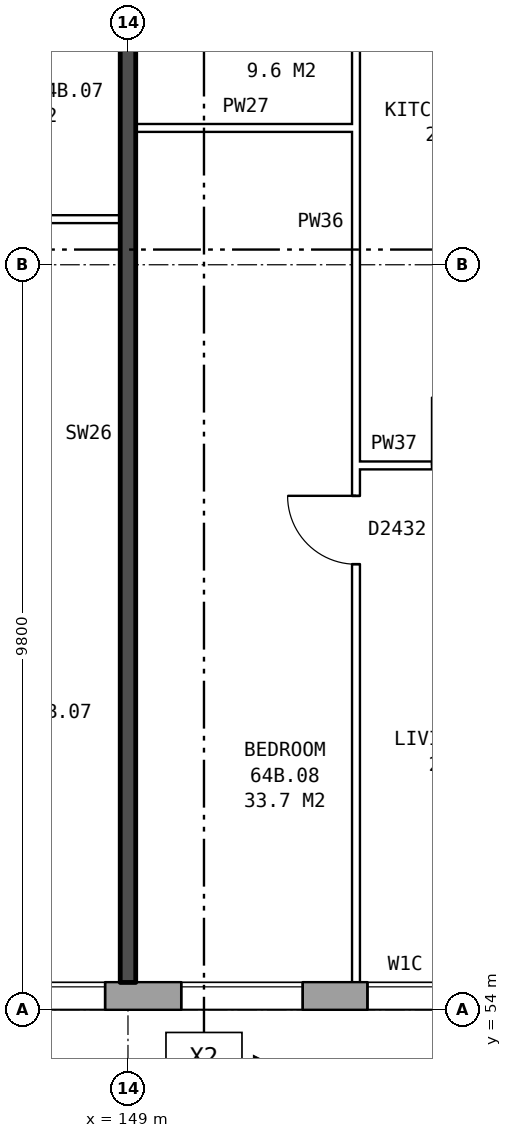
"""IFC4 building model, lengths in metres.
Left out: names, types, materials, properties, quantities, classifications, styles, units other than length and angle.
Written with IfcOpenShell. Run it as: python <this file> out.ifc"""

import sys

from ifc_helpers import new_model, si_unit, direction, frame, frame_2d, origin, place, context, subcontext, project, spatial, rectangle, extrude, element, fill, save


model = new_model("IFC4")
c1 = context("Model", 3, precision=1e-05, world=origin(), true_north=direction((0.0, 1.0)))
c2 = subcontext(c1, "Body", "Model", "MODEL_VIEW")
j1 = project(units=[si_unit("LENGTHUNIT", "METRE"), si_unit("PLANEANGLEUNIT", "RADIAN")], contexts=[c1])
p1 = place(None, origin())
s1 = spatial("IfcSite", under=j1, at=p1, CompositionType="ELEMENT")
p2 = place(p1, origin())
s2 = spatial("IfcBuilding", under=s1, at=p2, CompositionType="ELEMENT")
p3 = place(p2, frame((0.0, 0.0, 227.6)))
s3 = spatial("IfcBuildingStorey", under=s2, at=p3, CompositionType="ELEMENT", Elevation=227.6)
p4 = place(p3, frame((132.05, 54.18, 0.0), z_axis=(0.0, 0.0, 1.0), x_axis=(1.0, 0.0, 0.0)))
e1 = element("IfcWall", 1, at=p4, inside=s3, PredefinedType="STANDARD", context=c2, shape_type="SweptSolid", body=[
    extrude(rectangle(XDim=33.875, YDim=0.36, at=frame_2d((16.938, 0.0))), origin(), (0.0, 0.0, 1.0), 2.85),
])
p5 = place(p4, frame((2.65, 0.0, 0.8)))
e2 = element("IfcOpeningElement", 2, at=p5, cuts=e1, PredefinedType="OPENING", context=c2, shape_type="SweptSolid", body=[
    extrude(rectangle(XDim=1.6, YDim=1.8, at=frame_2d((0.8, 0.9))), frame((0.0, 0.19, 0.0), z_axis=(0.0, -1.0, 0.0), x_axis=(1.0, 0.0, 0.0)), (0.0, 0.0, 1.0), 0.38),
])
p6 = place(p4, frame((5.65, 0.0, 0.8)))
e3 = element("IfcOpeningElement", 3, at=p6, cuts=e1, PredefinedType="OPENING", context=c2, shape_type="SweptSolid", body=[
    extrude(rectangle(XDim=1.6, YDim=1.8, at=frame_2d((0.8, 0.9))), frame((0.0, 0.19, 0.0), z_axis=(0.0, -1.0, 0.0), x_axis=(1.0, 0.0, 0.0)), (0.0, 0.0, 1.0), 0.38),
])
p7 = place(p4, frame((8.65, 0.0, 0.8)))
e4 = element("IfcOpeningElement", 4, at=p7, cuts=e1, PredefinedType="OPENING", context=c2, shape_type="SweptSolid", body=[
    extrude(rectangle(XDim=1.6, YDim=1.8, at=frame_2d((0.8, 0.9))), frame((0.0, 0.19, 0.0), z_axis=(0.0, -1.0, 0.0), x_axis=(1.0, 0.0, 0.0)), (0.0, 0.0, 1.0), 0.38),
])
p8 = place(p4, frame((11.15, 0.0, 0.8)))
e5 = element("IfcOpeningElement", 5, at=p8, cuts=e1, PredefinedType="OPENING", context=c2, shape_type="SweptSolid", body=[
    extrude(rectangle(XDim=1.4, YDim=1.8, at=frame_2d((0.7, 0.9))), frame((0.0, 0.19, 0.0), z_axis=(0.0, -1.0, 0.0), x_axis=(1.0, 0.0, 0.0)), (0.0, 0.0, 1.0), 0.38),
])
p9 = place(p4, frame((15.05, 0.0, 0.8)))
e6 = element("IfcOpeningElement", 6, at=p9, cuts=e1, PredefinedType="OPENING", context=c2, shape_type="SweptSolid", body=[
    extrude(rectangle(XDim=1.6, YDim=1.8, at=frame_2d((0.8, 0.9))), frame((0.0, 0.19, 0.0), z_axis=(0.0, -1.0, 0.0), x_axis=(1.0, 0.0, 0.0)), (0.0, 0.0, 1.0), 0.38),
])
p10 = place(p4, frame((17.65, 0.0, 0.8)))
e7 = element("IfcOpeningElement", 7, at=p10, cuts=e1, PredefinedType="OPENING", context=c2, shape_type="SweptSolid", body=[
    extrude(rectangle(XDim=1.6, YDim=1.8, at=frame_2d((0.8, 0.9))), frame((0.0, 0.19, 0.0), z_axis=(0.0, -1.0, 0.0), x_axis=(1.0, 0.0, 0.0)), (0.0, 0.0, 1.0), 0.38),
])
p11 = place(p4, frame((20.1, 0.0, 0.35)))
e8 = element("IfcOpeningElement", 8, at=p11, cuts=e1, PredefinedType="OPENING", context=c2, shape_type="SweptSolid", body=[
    extrude(rectangle(XDim=1.0, YDim=1.8, at=frame_2d((0.5, 0.9))), frame((0.0, 0.19, 0.0), z_axis=(0.0, -1.0, 0.0), x_axis=(1.0, 0.0, 0.0)), (0.0, 0.0, 1.0), 0.38),
])
p12 = place(p4, frame((23.65, 0.0, 0.8)))
e9 = element("IfcOpeningElement", 9, at=p12, cuts=e1, PredefinedType="OPENING", context=c2, shape_type="SweptSolid", body=[
    extrude(rectangle(XDim=1.6, YDim=1.8, at=frame_2d((0.8, 0.9))), frame((0.0, 0.19, 0.0), z_axis=(0.0, -1.0, 0.0), x_axis=(1.0, 0.0, 0.0)), (0.0, 0.0, 1.0), 0.38),
])
p13 = place(p4, frame((26.65, 0.0, 0.8)))
e10 = element("IfcOpeningElement", 10, at=p13, cuts=e1, PredefinedType="OPENING", context=c2, shape_type="SweptSolid", body=[
    extrude(rectangle(XDim=1.6, YDim=1.8, at=frame_2d((0.8, 0.9))), frame((0.0, 0.19, 0.0), z_axis=(0.0, -1.0, 0.0), x_axis=(1.0, 0.0, 0.0)), (0.0, 0.0, 1.0), 0.38),
])
p14 = place(p4, frame((29.65, 0.0, 0.8)))
e11 = element("IfcOpeningElement", 11, at=p14, cuts=e1, PredefinedType="OPENING", context=c2, shape_type="SweptSolid", body=[
    extrude(rectangle(XDim=1.6, YDim=1.8, at=frame_2d((0.8, 0.9))), frame((0.0, 0.19, 0.0), z_axis=(0.0, -1.0, 0.0), x_axis=(1.0, 0.0, 0.0)), (0.0, 0.0, 1.0), 0.38),
])
p15 = place(p4, frame((12.85, 0.0, 1.7)))
e12 = element("IfcOpeningElement", 12, at=p15, cuts=e1, PredefinedType="OPENING", context=c2, shape_type="SweptSolid", body=[
    extrude(rectangle(XDim=0.6, YDim=0.9, at=frame_2d((0.3, 0.45))), frame((0.0, 0.19, 0.0), z_axis=(0.0, -1.0, 0.0), x_axis=(1.0, 0.0, 0.0)), (0.0, 0.0, 1.0), 0.38),
])
p16 = place(p3, frame((152.0, 61.16, 0.0), z_axis=(0.0, 0.0, 1.0), x_axis=(1.0, 0.0, 0.0)))
e13 = element("IfcWall", 13, at=p16, inside=s3, PredefinedType="PARTITIONING", context=c2, shape_type="SweptSolid", body=[
    extrude(rectangle(XDim=2.9, YDim=0.1, at=frame_2d((1.45, 0.0))), origin(), (0.0, 0.0, 1.0), 2.85),
])
p17 = place(p16, frame((1.0, 0.0, 0.0)))
e14 = element("IfcOpeningElement", 14, at=p17, cuts=e13, PredefinedType="OPENING", context=c2, shape_type="SweptSolid", body=[
    extrude(rectangle(XDim=0.9, YDim=2.1, at=frame_2d((0.45, 1.05))), frame((0.0, 0.06, 0.0), z_axis=(0.0, -1.0, 0.0), x_axis=(1.0, 0.0, 0.0)), (0.0, 0.0, 1.0), 0.12),
])
for number, where, z_axis, x_axis in (
    (15, (146.0, 64.4, 0.0), (0.0, 0.0, 1.0), (1.0, 0.0, 0.0)),
    (16, (149.1, 65.6, 0.0), (0.0, 0.0, 1.0), (1.0, 0.0, 0.0)),
):
    element("IfcWall", number, at=place(p3, frame(where, z_axis=z_axis, x_axis=x_axis)), inside=s3, PredefinedType="PARTITIONING", context=c2, shape_type="SweptSolid", body=[
        extrude(rectangle(XDim=2.9, YDim=0.1, at=frame_2d((1.45, 0.0))), origin(), (0.0, 0.0, 1.0), 2.85),
    ])
p18 = place(p3, frame((149.0, 54.36, 0.0), z_axis=(0.0, 0.0, 1.0), x_axis=(0.0, 1.0, 0.0)))
e17 = element("IfcWall", 17, at=p18, inside=s3, PredefinedType="SOLIDWALL", context=c2, shape_type="SweptSolid", body=[
    extrude(rectangle(XDim=14.44, YDim=0.2, at=frame_2d((7.22, 0.0))), origin(), (0.0, 0.0, 1.0), 2.85),
])
p19 = place(p3, frame((152.0, 54.36, 0.0), z_axis=(0.0, 0.0, 1.0), x_axis=(0.0, 1.0, 0.0)))
e18 = element("IfcWall", 18, at=p19, inside=s3, PredefinedType="PARTITIONING", context=c2, shape_type="SweptSolid", body=[
    extrude(rectangle(XDim=14.34, YDim=0.1, at=frame_2d((7.17, 0.0))), origin(), (0.0, 0.0, 1.0), 2.85),
])
p20 = place(p19, frame((5.5, 0.0, 0.0)))
e19 = element("IfcOpeningElement", 19, at=p20, cuts=e18, PredefinedType="OPENING", context=c2, shape_type="SweptSolid", body=[
    extrude(rectangle(XDim=0.9, YDim=2.1, at=frame_2d((0.45, 1.05))), frame((0.0, 0.06, 0.0), z_axis=(0.0, -1.0, 0.0), x_axis=(1.0, 0.0, 0.0)), (0.0, 0.0, 1.0), 0.12),
])
p21 = place(p19, frame((13.04, 0.0, 0.0)))
e20 = element("IfcOpeningElement", 20, at=p21, cuts=e18, PredefinedType="OPENING", context=c2, shape_type="SweptSolid", body=[
    extrude(rectangle(XDim=0.9, YDim=2.1, at=frame_2d((0.45, 1.05))), frame((0.0, 0.06, 0.0), z_axis=(0.0, -1.0, 0.0), x_axis=(1.0, 0.0, 0.0)), (0.0, 0.0, 1.0), 0.12),
])
p22 = place(p9, origin())
e21 = element("IfcWindow", 21, at=p22, inside=s3, PartitioningType="SINGLE_PANEL", PredefinedType="WINDOW", context=c2, shape_type="SweptSolid", body=[
    extrude(rectangle(XDim=1.6, YDim=1.8, at=frame_2d((0.8, 0.9))), frame((0.0, 0.15, 0.0), z_axis=(0.0, -1.0, 0.0), x_axis=(1.0, 0.0, 0.0)), (0.0, 0.0, 1.0), 0.06),
])
fill(e6, e21)
p23 = place(p10, origin())
e22 = element("IfcWindow", 22, at=p23, inside=s3, PartitioningType="SINGLE_PANEL", PredefinedType="WINDOW", context=c2, shape_type="SweptSolid", body=[
    extrude(rectangle(XDim=1.6, YDim=1.8, at=frame_2d((0.8, 0.9))), frame((0.0, 0.15, 0.0), z_axis=(0.0, -1.0, 0.0), x_axis=(1.0, 0.0, 0.0)), (0.0, 0.0, 1.0), 0.06),
])
fill(e7, e22)
p24 = place(p11, origin())
e23 = element("IfcWindow", 23, at=p24, inside=s3, PartitioningType="SINGLE_PANEL", PredefinedType="WINDOW", context=c2, shape_type="SweptSolid", body=[
    extrude(rectangle(XDim=1.0, YDim=1.8, at=frame_2d((0.5, 0.9))), frame((0.0, 0.15, 0.0), z_axis=(0.0, -1.0, 0.0), x_axis=(1.0, 0.0, 0.0)), (0.0, 0.0, 1.0), 0.06),
])
fill(e8, e23)
p25 = place(p20, origin())
e24 = element("IfcDoor", 24, at=p25, inside=s3, OperationType="SINGLE_SWING_RIGHT", PredefinedType="DOOR", context=c2, shape_type="SweptSolid", body=[
    extrude(rectangle(XDim=0.9, YDim=2.1, at=frame_2d((0.45, 1.05))), frame((0.0, 0.025, 0.0), z_axis=(0.0, -1.0, 0.0), x_axis=(1.0, 0.0, 0.0)), (0.0, 0.0, 1.0), 0.05),
])
fill(e19, e24)
save(model, sys.argv[1])
